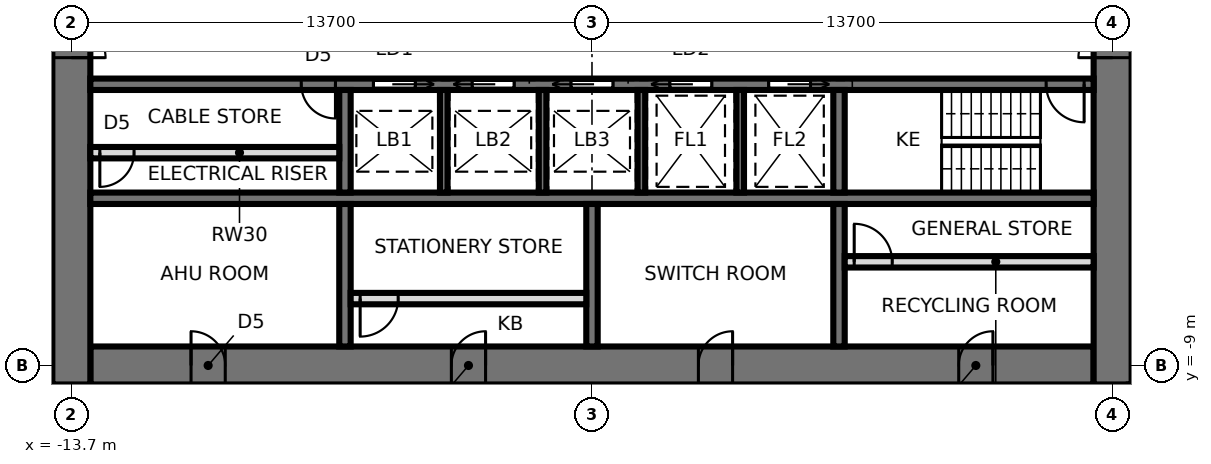
"""IFC4 building model, lengths in metres.
Left out: names, types, materials, properties, quantities, classifications, styles, units other than length and angle.
Written with IfcOpenShell. Run it as: python <this file> out.ifc"""

import sys

from ifc_helpers import new_model, si_unit, direction, frame, frame_2d, origin, place, context, subcontext, project, spatial, rectangle, extrude, element, fill, save


model = new_model("IFC4")
c1 = context("Model", 3, precision=1e-05, world=origin(), true_north=direction((0.0, 1.0)))
c2 = subcontext(c1, "Body", "Model", "MODEL_VIEW")
j1 = project(units=[si_unit("LENGTHUNIT", "METRE"), si_unit("PLANEANGLEUNIT", "RADIAN")], contexts=[c1])
p1 = place(None, origin())
s1 = spatial("IfcSite", under=j1, at=p1, CompositionType="ELEMENT")
p2 = place(p1, origin())
s2 = spatial("IfcBuilding", under=s1, at=p2, CompositionType="ELEMENT")
p3 = place(p2, frame((0.0, 0.0, 147.0)))
s3 = spatial("IfcBuildingStorey", under=s2, at=p3, CompositionType="ELEMENT", Elevation=147.0)
p4 = place(p3, frame((-13.2, -9.0, 0.0), z_axis=(0.0, 0.0, 1.0), x_axis=(1.0, 0.0, 0.0)))
e1 = element("IfcWall", 1, at=p4, inside=s3, PredefinedType="SHEAR", context=c2, shape_type="SweptSolid", body=[
    extrude(rectangle(XDim=26.4, YDim=1.0, at=frame_2d((13.2, 0.0))), origin(), (0.0, 0.0, 1.0), 3.9),
])
p5 = place(p4, frame((2.65, 0.0, 0.0)))
e2 = element("IfcOpeningElement", 2, at=p5, cuts=e1, PredefinedType="OPENING", context=c2, shape_type="SweptSolid", body=[
    extrude(rectangle(XDim=0.9, YDim=2.1, at=frame_2d((0.45, 1.05))), frame((0.0, 0.51, 0.0), z_axis=(0.0, -1.0, 0.0), x_axis=(1.0, 0.0, 0.0)), (0.0, 0.0, 1.0), 1.02),
])
p6 = place(p4, frame((9.5, 0.0, 0.0)))
e3 = element("IfcOpeningElement", 3, at=p6, cuts=e1, PredefinedType="OPENING", context=c2, shape_type="SweptSolid", body=[
    extrude(rectangle(XDim=0.9, YDim=2.1, at=frame_2d((0.45, 1.05))), frame((0.0, 0.51, 0.0), z_axis=(0.0, -1.0, 0.0), x_axis=(1.0, 0.0, 0.0)), (0.0, 0.0, 1.0), 1.02),
])
p7 = place(p4, frame((16.0, 0.0, 0.0)))
e4 = element("IfcOpeningElement", 4, at=p7, cuts=e1, PredefinedType="OPENING", context=c2, shape_type="SweptSolid", body=[
    extrude(rectangle(XDim=0.9, YDim=2.1, at=frame_2d((0.45, 1.05))), frame((0.0, 0.51, 0.0), z_axis=(0.0, -1.0, 0.0), x_axis=(1.0, 0.0, 0.0)), (0.0, 0.0, 1.0), 1.02),
])
p8 = place(p4, frame((22.85, 0.0, 0.0)))
e5 = element("IfcOpeningElement", 5, at=p8, cuts=e1, PredefinedType="OPENING", context=c2, shape_type="SweptSolid", body=[
    extrude(rectangle(XDim=0.9, YDim=2.1, at=frame_2d((0.45, 1.05))), frame((0.0, 0.51, 0.0), z_axis=(0.0, -1.0, 0.0), x_axis=(1.0, 0.0, 0.0)), (0.0, 0.0, 1.0), 1.02),
])
p9 = place(p3, frame((13.7, -9.5, 0.0), z_axis=(0.0, 0.0, 1.0), x_axis=(0.0, 1.0, 0.0)))
e6 = element("IfcWall", 6, at=p9, inside=s3, PredefinedType="SHEAR", context=c2, shape_type="SweptSolid", body=[
    extrude(rectangle(XDim=19.0, YDim=1.0, at=frame_2d((9.5, 0.0))), origin(), (0.0, 0.0, 1.0), 3.9),
])
p10 = place(p9, frame((8.6, 0.0, 0.0)))
e7 = element("IfcOpeningElement", 7, at=p10, cuts=e6, PredefinedType="OPENING", context=c2, shape_type="SweptSolid", body=[
    extrude(rectangle(XDim=1.8, YDim=2.4, at=frame_2d((0.9, 1.2))), frame((0.0, 0.51, 0.0), z_axis=(0.0, -1.0, 0.0), x_axis=(1.0, 0.0, 0.0)), (0.0, 0.0, 1.0), 1.02),
])
p11 = place(p3, frame((-13.7, 9.5, 0.0), z_axis=(0.0, 0.0, 1.0), x_axis=(0.0, -1.0, 0.0)))
e8 = element("IfcWall", 8, at=p11, inside=s3, PredefinedType="SHEAR", context=c2, shape_type="SweptSolid", body=[
    extrude(rectangle(XDim=19.0, YDim=1.0, at=frame_2d((9.5, 0.0))), origin(), (0.0, 0.0, 1.0), 3.9),
])
p12 = place(p11, frame((8.6, 0.0, 0.0)))
e9 = element("IfcOpeningElement", 9, at=p12, cuts=e8, PredefinedType="OPENING", context=c2, shape_type="SweptSolid", body=[
    extrude(rectangle(XDim=1.8, YDim=2.4, at=frame_2d((0.9, 1.2))), frame((0.0, 0.51, 0.0), z_axis=(0.0, -1.0, 0.0), x_axis=(1.0, 0.0, 0.0)), (0.0, 0.0, 1.0), 1.02),
])
p13 = place(p3, frame((-13.2, -1.6, 0.0), z_axis=(0.0, 0.0, 1.0), x_axis=(1.0, 0.0, 0.0)))
e10 = element("IfcWall", 10, at=p13, inside=s3, PredefinedType="SHEAR", context=c2, shape_type="SweptSolid", body=[
    extrude(rectangle(XDim=26.4, YDim=0.3, at=frame_2d((13.2, 0.0))), origin(), (0.0, 0.0, 1.0), 3.9),
])
p14 = place(p13, frame((25.15, 0.0, 0.0)))
e11 = element("IfcOpeningElement", 11, at=p14, cuts=e10, PredefinedType="OPENING", context=c2, shape_type="SweptSolid", body=[
    extrude(rectangle(XDim=1.0, YDim=2.1, at=frame_2d((0.5, 1.05))), frame((0.0, 0.16, 0.0), z_axis=(0.0, -1.0, 0.0), x_axis=(1.0, 0.0, 0.0)), (0.0, 0.0, 1.0), 0.32),
])
p15 = place(p13, frame((7.45, 0.0, 0.0)))
e12 = element("IfcOpeningElement", 12, at=p15, cuts=e10, PredefinedType="OPENING", context=c2, shape_type="SweptSolid", body=[
    extrude(rectangle(XDim=1.1, YDim=2.3, at=frame_2d((0.55, 1.15))), frame((0.0, 0.16, 0.0), z_axis=(0.0, -1.0, 0.0), x_axis=(1.0, 0.0, 0.0)), (0.0, 0.0, 1.0), 0.32),
])
p16 = place(p13, frame((10.05, 0.0, 0.0)))
e13 = element("IfcOpeningElement", 13, at=p16, cuts=e10, PredefinedType="OPENING", context=c2, shape_type="SweptSolid", body=[
    extrude(rectangle(XDim=1.1, YDim=2.3, at=frame_2d((0.55, 1.15))), frame((0.0, 0.16, 0.0), z_axis=(0.0, -1.0, 0.0), x_axis=(1.0, 0.0, 0.0)), (0.0, 0.0, 1.0), 0.32),
])
p17 = place(p13, frame((12.65, 0.0, 0.0)))
e14 = element("IfcOpeningElement", 14, at=p17, cuts=e10, PredefinedType="OPENING", context=c2, shape_type="SweptSolid", body=[
    extrude(rectangle(XDim=1.1, YDim=2.3, at=frame_2d((0.55, 1.15))), frame((0.0, 0.16, 0.0), z_axis=(0.0, -1.0, 0.0), x_axis=(1.0, 0.0, 0.0)), (0.0, 0.0, 1.0), 0.32),
])
p18 = place(p13, frame((15.25, 0.0, 0.0)))
e15 = element("IfcOpeningElement", 15, at=p18, cuts=e10, PredefinedType="OPENING", context=c2, shape_type="SweptSolid", body=[
    extrude(rectangle(XDim=1.1, YDim=2.3, at=frame_2d((0.55, 1.15))), frame((0.0, 0.16, 0.0), z_axis=(0.0, -1.0, 0.0), x_axis=(1.0, 0.0, 0.0)), (0.0, 0.0, 1.0), 0.32),
])
p19 = place(p13, frame((17.85, 0.0, 0.0)))
e16 = element("IfcOpeningElement", 16, at=p19, cuts=e10, PredefinedType="OPENING", context=c2, shape_type="SweptSolid", body=[
    extrude(rectangle(XDim=1.1, YDim=2.3, at=frame_2d((0.55, 1.15))), frame((0.0, 0.16, 0.0), z_axis=(0.0, -1.0, 0.0), x_axis=(1.0, 0.0, 0.0)), (0.0, 0.0, 1.0), 0.32),
])
p20 = place(p13, frame((5.55, 0.0, 0.0)))
e17 = element("IfcOpeningElement", 17, at=p20, cuts=e10, PredefinedType="OPENING", context=c2, shape_type="SweptSolid", body=[
    extrude(rectangle(XDim=0.9, YDim=2.1, at=frame_2d((0.45, 1.05))), frame((0.0, 0.16, 0.0), z_axis=(0.0, -1.0, 0.0), x_axis=(1.0, 0.0, 0.0)), (0.0, 0.0, 1.0), 0.32),
])
p21 = place(p3, frame((-13.2, -4.6, 0.0), z_axis=(0.0, 0.0, 1.0), x_axis=(1.0, 0.0, 0.0)))
e18 = element("IfcWall", 18, at=p21, inside=s3, PredefinedType="SHEAR", context=c2, shape_type="SweptSolid", body=[
    extrude(rectangle(XDim=26.4, YDim=0.3, at=frame_2d((13.2, 0.0))), origin(), (0.0, 0.0, 1.0), 3.9),
])
p22 = place(p3, frame((-6.5, -1.75, 0.0), z_axis=(0.0, 0.0, 1.0), x_axis=(0.0, -1.0, 0.0)))
e19 = element("IfcWall", 19, at=p22, inside=s3, PredefinedType="SHEAR", context=c2, shape_type="SweptSolid", body=[
    extrude(rectangle(XDim=2.7, YDim=0.3, at=frame_2d((1.35, 0.0))), origin(), (0.0, 0.0, 1.0), 3.9),
])
p23 = place(p3, frame((-6.5, -4.75, 0.0), z_axis=(0.0, 0.0, 1.0), x_axis=(0.0, -1.0, 0.0)))
e20 = element("IfcWall", 20, at=p23, inside=s3, PredefinedType="SHEAR", context=c2, shape_type="SweptSolid", body=[
    extrude(rectangle(XDim=3.75, YDim=0.3, at=frame_2d((1.875, 0.0))), origin(), (0.0, 0.0, 1.0), 3.9),
])
p24 = place(p3, frame((6.5, -1.75, 0.0), z_axis=(0.0, 0.0, 1.0), x_axis=(0.0, -1.0, 0.0)))
e21 = element("IfcWall", 21, at=p24, inside=s3, PredefinedType="SHEAR", context=c2, shape_type="SweptSolid", body=[
    extrude(rectangle(XDim=2.7, YDim=0.3, at=frame_2d((1.35, 0.0))), origin(), (0.0, 0.0, 1.0), 3.9),
])
p25 = place(p3, frame((6.5, -4.75, 0.0), z_axis=(0.0, 0.0, 1.0), x_axis=(0.0, -1.0, 0.0)))
e22 = element("IfcWall", 22, at=p25, inside=s3, PredefinedType="SHEAR", context=c2, shape_type="SweptSolid", body=[
    extrude(rectangle(XDim=3.75, YDim=0.3, at=frame_2d((1.875, 0.0))), origin(), (0.0, 0.0, 1.0), 3.9),
])
for number, where, z_axis, x_axis in (
    (23, (-3.9, -1.75, 0.0), (0.0, 0.0, 1.0), (0.0, -1.0, 0.0)),
    (24, (-1.3, -1.75, 0.0), (0.0, 0.0, 1.0), (0.0, -1.0, 0.0)),
    (25, (1.3, -1.75, 0.0), (0.0, 0.0, 1.0), (0.0, -1.0, 0.0)),
    (26, (3.9, -1.75, 0.0), (0.0, 0.0, 1.0), (0.0, -1.0, 0.0)),
):
    element("IfcWall", number, at=place(p3, frame(where, z_axis=z_axis, x_axis=x_axis)), inside=s3, PredefinedType="SHEAR", context=c2, shape_type="SweptSolid", body=[
        extrude(rectangle(XDim=2.7, YDim=0.2, at=frame_2d((1.35, 0.0))), origin(), (0.0, 0.0, 1.0), 3.9),
    ])
p26 = place(p3, frame((0.0, -4.75, 0.0), z_axis=(0.0, 0.0, 1.0), x_axis=(0.0, -1.0, 0.0)))
e27 = element("IfcWall", 27, at=p26, inside=s3, PredefinedType="SHEAR", context=c2, shape_type="SweptSolid", body=[
    extrude(rectangle(XDim=3.75, YDim=0.3, at=frame_2d((1.875, 0.0))), origin(), (0.0, 0.0, 1.0), 3.9),
])
p27 = place(p3, frame((-6.35, -7.24, 0.0), z_axis=(0.0, 0.0, 1.0), x_axis=(1.0, 0.0, 0.0)))
e28 = element("IfcWall", 28, at=p27, inside=s3, PredefinedType="PARTITIONING", context=c2, shape_type="SweptSolid", body=[
    extrude(rectangle(XDim=6.2, YDim=0.3, at=frame_2d((3.1, 0.0))), origin(), (0.0, 0.0, 1.0), 3.74),
])
p28 = place(p27, frame((0.25, 0.0, 0.0)))
e29 = element("IfcOpeningElement", 29, at=p28, cuts=e28, PredefinedType="OPENING", context=c2, shape_type="SweptSolid", body=[
    extrude(rectangle(XDim=1.0, YDim=2.4, at=frame_2d((0.5, 1.2))), frame((0.0, 0.16, 0.0), z_axis=(0.0, -1.0, 0.0), x_axis=(1.0, 0.0, 0.0)), (0.0, 0.0, 1.0), 0.32),
])
p29 = place(p3, frame((6.65, -6.272, 0.0), z_axis=(0.0, 0.0, 1.0), x_axis=(1.0, 0.0, 0.0)))
e30 = element("IfcWall", 30, at=p29, inside=s3, PredefinedType="PARTITIONING", context=c2, shape_type="SweptSolid", body=[
    extrude(rectangle(XDim=6.55, YDim=0.3, at=frame_2d((3.275, 0.0))), origin(), (0.0, 0.0, 1.0), 3.74),
])
p30 = place(p29, frame((0.25, 0.0, 0.0)))
e31 = element("IfcOpeningElement", 31, at=p30, cuts=e30, PredefinedType="OPENING", context=c2, shape_type="SweptSolid", body=[
    extrude(rectangle(XDim=1.0, YDim=2.4, at=frame_2d((0.5, 1.2))), frame((0.0, 0.16, 0.0), z_axis=(0.0, -1.0, 0.0), x_axis=(1.0, 0.0, 0.0)), (0.0, 0.0, 1.0), 0.32),
])
p31 = place(p3, frame((-13.2, -3.4, 0.0), z_axis=(0.0, 0.0, 1.0), x_axis=(1.0, 0.0, 0.0)))
e32 = element("IfcWall", 32, at=p31, inside=s3, PredefinedType="SOLIDWALL", context=c2, shape_type="SweptSolid", body=[
    extrude(rectangle(XDim=6.55, YDim=0.3, at=frame_2d((3.275, 0.0))), origin(), (0.0, 0.0, 1.0), 3.74),
])
p32 = place(p31, frame((0.25, 0.0, 0.0)))
e33 = element("IfcOpeningElement", 33, at=p32, cuts=e32, PredefinedType="OPENING", context=c2, shape_type="SweptSolid", body=[
    extrude(rectangle(XDim=0.9, YDim=2.1, at=frame_2d((0.45, 1.05))), frame((0.0, 0.16, 0.0), z_axis=(0.0, -1.0, 0.0), x_axis=(1.0, 0.0, 0.0)), (0.0, 0.0, 1.0), 0.32),
])
p33 = place(p12, origin())
e34 = element("IfcDoor", 34, at=p33, inside=s3, OperationType="DOUBLE_DOOR_SINGLE_SWING", PredefinedType="DOOR", context=c2, shape_type="SweptSolid", body=[
    extrude(rectangle(XDim=1.72, YDim=2.36, at=frame_2d((0.9, 1.18))), frame((0.0, 0.025, 0.0), z_axis=(0.0, -1.0, 0.0), x_axis=(1.0, 0.0, 0.0)), (0.0, 0.0, 1.0), 0.05),
    extrude(rectangle(XDim=0.04, YDim=2.4, at=frame_2d((0.02, 1.2))), frame((0.0, 0.25, 0.0), z_axis=(0.0, -1.0, 0.0), x_axis=(1.0, 0.0, 0.0)), (0.0, 0.0, 1.0), 0.5),
    extrude(rectangle(XDim=0.04, YDim=2.4, at=frame_2d((1.78, 1.2))), frame((0.0, 0.25, 0.0), z_axis=(0.0, -1.0, 0.0), x_axis=(1.0, 0.0, 0.0)), (0.0, 0.0, 1.0), 0.5),
    extrude(rectangle(XDim=1.72, YDim=0.04, at=frame_2d((0.9, 2.38))), frame((0.0, 0.25, 0.0), z_axis=(0.0, -1.0, 0.0), x_axis=(1.0, 0.0, 0.0)), (0.0, 0.0, 1.0), 0.5),
])
fill(e9, e34)
p34 = place(p10, origin())
e35 = element("IfcDoor", 35, at=p34, inside=s3, OperationType="DOUBLE_DOOR_SINGLE_SWING", PredefinedType="DOOR", context=c2, shape_type="SweptSolid", body=[
    extrude(rectangle(XDim=1.72, YDim=2.36, at=frame_2d((0.9, 1.18))), frame((0.0, 0.025, 0.0), z_axis=(0.0, -1.0, 0.0), x_axis=(1.0, 0.0, 0.0)), (0.0, 0.0, 1.0), 0.05),
    extrude(rectangle(XDim=0.04, YDim=2.4, at=frame_2d((0.02, 1.2))), frame((0.0, 0.25, 0.0), z_axis=(0.0, -1.0, 0.0), x_axis=(1.0, 0.0, 0.0)), (0.0, 0.0, 1.0), 0.5),
    extrude(rectangle(XDim=0.04, YDim=2.4, at=frame_2d((1.78, 1.2))), frame((0.0, 0.25, 0.0), z_axis=(0.0, -1.0, 0.0), x_axis=(1.0, 0.0, 0.0)), (0.0, 0.0, 1.0), 0.5),
    extrude(rectangle(XDim=1.72, YDim=0.04, at=frame_2d((0.9, 2.38))), frame((0.0, 0.25, 0.0), z_axis=(0.0, -1.0, 0.0), x_axis=(1.0, 0.0, 0.0)), (0.0, 0.0, 1.0), 0.5),
])
fill(e7, e35)
p35 = place(p14, frame((1.0, 0.0, 0.0), z_axis=(0.0, 0.0, 1.0), x_axis=(-1.0, 0.0, 0.0)))
e36 = element("IfcDoor", 36, at=p35, inside=s3, OperationType="SINGLE_SWING_LEFT", PredefinedType="DOOR", context=c2, shape_type="SweptSolid", body=[
    extrude(rectangle(XDim=1.0, YDim=2.1, at=frame_2d((0.5, 1.05))), frame((0.0, 0.025, 0.0), z_axis=(0.0, -1.0, 0.0), x_axis=(1.0, 0.0, 0.0)), (0.0, 0.0, 1.0), 0.05),
])
fill(e11, e36)
p36 = place(p15, frame((1.1, 0.0, 0.0), z_axis=(0.0, 0.0, 1.0), x_axis=(-1.0, 0.0, 0.0)))
e37 = element("IfcDoor", 37, at=p36, inside=s3, OperationType="SLIDING_TO_LEFT", PredefinedType="DOOR", context=c2, shape_type="SweptSolid", body=[
    extrude(rectangle(XDim=1.1, YDim=2.3, at=frame_2d((0.55, 1.15))), frame((0.0, 0.025, 0.0), z_axis=(0.0, -1.0, 0.0), x_axis=(1.0, 0.0, 0.0)), (0.0, 0.0, 1.0), 0.05),
])
fill(e12, e37)
p37 = place(p16, frame((1.1, 0.0, 0.0), z_axis=(0.0, 0.0, 1.0), x_axis=(-1.0, 0.0, 0.0)))
e38 = element("IfcDoor", 38, at=p37, inside=s3, OperationType="SLIDING_TO_RIGHT", PredefinedType="DOOR", context=c2, shape_type="SweptSolid", body=[
    extrude(rectangle(XDim=1.1, YDim=2.3, at=frame_2d((0.55, 1.15))), frame((0.0, 0.025, 0.0), z_axis=(0.0, -1.0, 0.0), x_axis=(1.0, 0.0, 0.0)), (0.0, 0.0, 1.0), 0.05),
])
fill(e13, e38)
p38 = place(p17, frame((1.1, 0.0, 0.0), z_axis=(0.0, 0.0, 1.0), x_axis=(-1.0, 0.0, 0.0)))
e39 = element("IfcDoor", 39, at=p38, inside=s3, OperationType="SLIDING_TO_RIGHT", PredefinedType="DOOR", context=c2, shape_type="SweptSolid", body=[
    extrude(rectangle(XDim=1.1, YDim=2.3, at=frame_2d((0.55, 1.15))), frame((0.0, 0.025, 0.0), z_axis=(0.0, -1.0, 0.0), x_axis=(1.0, 0.0, 0.0)), (0.0, 0.0, 1.0), 0.05),
])
fill(e14, e39)
p39 = place(p18, frame((1.1, 0.0, 0.0), z_axis=(0.0, 0.0, 1.0), x_axis=(-1.0, 0.0, 0.0)))
e40 = element("IfcDoor", 40, at=p39, inside=s3, OperationType="SLIDING_TO_RIGHT", PredefinedType="DOOR", context=c2, shape_type="SweptSolid", body=[
    extrude(rectangle(XDim=1.1, YDim=2.3, at=frame_2d((0.55, 1.15))), frame((0.0, 0.025, 0.0), z_axis=(0.0, -1.0, 0.0), x_axis=(1.0, 0.0, 0.0)), (0.0, 0.0, 1.0), 0.05),
])
fill(e15, e40)
p40 = place(p19, frame((1.1, 0.0, 0.0), z_axis=(0.0, 0.0, 1.0), x_axis=(-1.0, 0.0, 0.0)))
e41 = element("IfcDoor", 41, at=p40, inside=s3, OperationType="SLIDING_TO_LEFT", PredefinedType="DOOR", context=c2, shape_type="SweptSolid", body=[
    extrude(rectangle(XDim=1.1, YDim=2.3, at=frame_2d((0.55, 1.15))), frame((0.0, 0.025, 0.0), z_axis=(0.0, -1.0, 0.0), x_axis=(1.0, 0.0, 0.0)), (0.0, 0.0, 1.0), 0.05),
])
fill(e16, e41)
p41 = place(p20, frame((0.9, 0.0, 0.0), z_axis=(0.0, 0.0, 1.0), x_axis=(-1.0, 0.0, 0.0)))
e42 = element("IfcDoor", 42, at=p41, inside=s3, OperationType="SINGLE_SWING_LEFT", PredefinedType="DOOR", context=c2, shape_type="SweptSolid", body=[
    extrude(rectangle(XDim=0.9, YDim=2.1, at=frame_2d((0.45, 1.05))), frame((0.0, 0.025, 0.0), z_axis=(0.0, -1.0, 0.0), x_axis=(1.0, 0.0, 0.0)), (0.0, 0.0, 1.0), 0.05),
])
fill(e17, e42)
p42 = place(p5, origin())
e43 = element("IfcDoor", 43, at=p42, inside=s3, OperationType="SINGLE_SWING_LEFT", PredefinedType="DOOR", context=c2, shape_type="SweptSolid", body=[
    extrude(rectangle(XDim=0.82, YDim=2.06, at=frame_2d((0.45, 1.03))), frame((0.0, 0.025, 0.0), z_axis=(0.0, -1.0, 0.0), x_axis=(1.0, 0.0, 0.0)), (0.0, 0.0, 1.0), 0.05),
    extrude(rectangle(XDim=0.04, YDim=2.1, at=frame_2d((0.02, 1.05))), frame((0.0, 0.25, 0.0), z_axis=(0.0, -1.0, 0.0), x_axis=(1.0, 0.0, 0.0)), (0.0, 0.0, 1.0), 0.5),
    extrude(rectangle(XDim=0.04, YDim=2.1, at=frame_2d((0.88, 1.05))), frame((0.0, 0.25, 0.0), z_axis=(0.0, -1.0, 0.0), x_axis=(1.0, 0.0, 0.0)), (0.0, 0.0, 1.0), 0.5),
    extrude(rectangle(XDim=0.82, YDim=0.04, at=frame_2d((0.45, 2.08))), frame((0.0, 0.25, 0.0), z_axis=(0.0, -1.0, 0.0), x_axis=(1.0, 0.0, 0.0)), (0.0, 0.0, 1.0), 0.5),
])
fill(e2, e43)
p43 = place(p6, origin())
e44 = element("IfcDoor", 44, at=p43, inside=s3, OperationType="SINGLE_SWING_RIGHT", PredefinedType="DOOR", context=c2, shape_type="SweptSolid", body=[
    extrude(rectangle(XDim=0.82, YDim=2.06, at=frame_2d((0.45, 1.03))), frame((0.0, 0.025, 0.0), z_axis=(0.0, -1.0, 0.0), x_axis=(1.0, 0.0, 0.0)), (0.0, 0.0, 1.0), 0.05),
    extrude(rectangle(XDim=0.04, YDim=2.1, at=frame_2d((0.02, 1.05))), frame((0.0, 0.25, 0.0), z_axis=(0.0, -1.0, 0.0), x_axis=(1.0, 0.0, 0.0)), (0.0, 0.0, 1.0), 0.5),
    extrude(rectangle(XDim=0.04, YDim=2.1, at=frame_2d((0.88, 1.05))), frame((0.0, 0.25, 0.0), z_axis=(0.0, -1.0, 0.0), x_axis=(1.0, 0.0, 0.0)), (0.0, 0.0, 1.0), 0.5),
    extrude(rectangle(XDim=0.82, YDim=0.04, at=frame_2d((0.45, 2.08))), frame((0.0, 0.25, 0.0), z_axis=(0.0, -1.0, 0.0), x_axis=(1.0, 0.0, 0.0)), (0.0, 0.0, 1.0), 0.5),
])
fill(e3, e44)
p44 = place(p7, origin())
e45 = element("IfcDoor", 45, at=p44, inside=s3, OperationType="SINGLE_SWING_RIGHT", PredefinedType="DOOR", context=c2, shape_type="SweptSolid", body=[
    extrude(rectangle(XDim=0.82, YDim=2.06, at=frame_2d((0.45, 1.03))), frame((0.0, 0.025, 0.0), z_axis=(0.0, -1.0, 0.0), x_axis=(1.0, 0.0, 0.0)), (0.0, 0.0, 1.0), 0.05),
    extrude(rectangle(XDim=0.04, YDim=2.1, at=frame_2d((0.02, 1.05))), frame((0.0, 0.25, 0.0), z_axis=(0.0, -1.0, 0.0), x_axis=(1.0, 0.0, 0.0)), (0.0, 0.0, 1.0), 0.5),
    extrude(rectangle(XDim=0.04, YDim=2.1, at=frame_2d((0.88, 1.05))), frame((0.0, 0.25, 0.0), z_axis=(0.0, -1.0, 0.0), x_axis=(1.0, 0.0, 0.0)), (0.0, 0.0, 1.0), 0.5),
    extrude(rectangle(XDim=0.82, YDim=0.04, at=frame_2d((0.45, 2.08))), frame((0.0, 0.25, 0.0), z_axis=(0.0, -1.0, 0.0), x_axis=(1.0, 0.0, 0.0)), (0.0, 0.0, 1.0), 0.5),
])
fill(e4, e45)
p45 = place(p8, origin())
e46 = element("IfcDoor", 46, at=p45, inside=s3, OperationType="SINGLE_SWING_RIGHT", PredefinedType="DOOR", context=c2, shape_type="SweptSolid", body=[
    extrude(rectangle(XDim=0.82, YDim=2.06, at=frame_2d((0.45, 1.03))), frame((0.0, 0.025, 0.0), z_axis=(0.0, -1.0, 0.0), x_axis=(1.0, 0.0, 0.0)), (0.0, 0.0, 1.0), 0.05),
    extrude(rectangle(XDim=0.04, YDim=2.1, at=frame_2d((0.02, 1.05))), frame((0.0, 0.25, 0.0), z_axis=(0.0, -1.0, 0.0), x_axis=(1.0, 0.0, 0.0)), (0.0, 0.0, 1.0), 0.5),
    extrude(rectangle(XDim=0.04, YDim=2.1, at=frame_2d((0.88, 1.05))), frame((0.0, 0.25, 0.0), z_axis=(0.0, -1.0, 0.0), x_axis=(1.0, 0.0, 0.0)), (0.0, 0.0, 1.0), 0.5),
    extrude(rectangle(XDim=0.82, YDim=0.04, at=frame_2d((0.45, 2.08))), frame((0.0, 0.25, 0.0), z_axis=(0.0, -1.0, 0.0), x_axis=(1.0, 0.0, 0.0)), (0.0, 0.0, 1.0), 0.5),
])
fill(e5, e46)
p46 = place(p28, frame((1.0, 0.0, 0.0), z_axis=(0.0, 0.0, 1.0), x_axis=(-1.0, 0.0, 0.0)))
e47 = element("IfcDoor", 47, at=p46, inside=s3, OperationType="SINGLE_SWING_RIGHT", PredefinedType="DOOR", context=c2, shape_type="SweptSolid", body=[
    extrude(rectangle(XDim=1.0, YDim=2.4, at=frame_2d((0.5, 1.2))), frame((0.0, 0.025, 0.0), z_axis=(0.0, -1.0, 0.0), x_axis=(1.0, 0.0, 0.0)), (0.0, 0.0, 1.0), 0.05),
])
fill(e29, e47)
p47 = place(p30, origin())
e48 = element("IfcDoor", 48, at=p47, inside=s3, OperationType="SINGLE_SWING_LEFT", PredefinedType="DOOR", context=c2, shape_type="SweptSolid", body=[
    extrude(rectangle(XDim=1.0, YDim=2.4, at=frame_2d((0.5, 1.2))), frame((0.0, 0.025, 0.0), z_axis=(0.0, -1.0, 0.0), x_axis=(1.0, 0.0, 0.0)), (0.0, 0.0, 1.0), 0.05),
])
fill(e31, e48)
p48 = place(p32, frame((0.9, 0.0, 0.0), z_axis=(0.0, 0.0, 1.0), x_axis=(-1.0, 0.0, 0.0)))
e49 = element("IfcDoor", 49, at=p48, inside=s3, OperationType="SINGLE_SWING_RIGHT", PredefinedType="DOOR", context=c2, shape_type="SweptSolid", body=[
    extrude(rectangle(XDim=0.9, YDim=2.1, at=frame_2d((0.45, 1.05))), frame((0.0, 0.025, 0.0), z_axis=(0.0, -1.0, 0.0), x_axis=(1.0, 0.0, 0.0)), (0.0, 0.0, 1.0), 0.05),
])
fill(e33, e49)
save(model, sys.argv[1])
